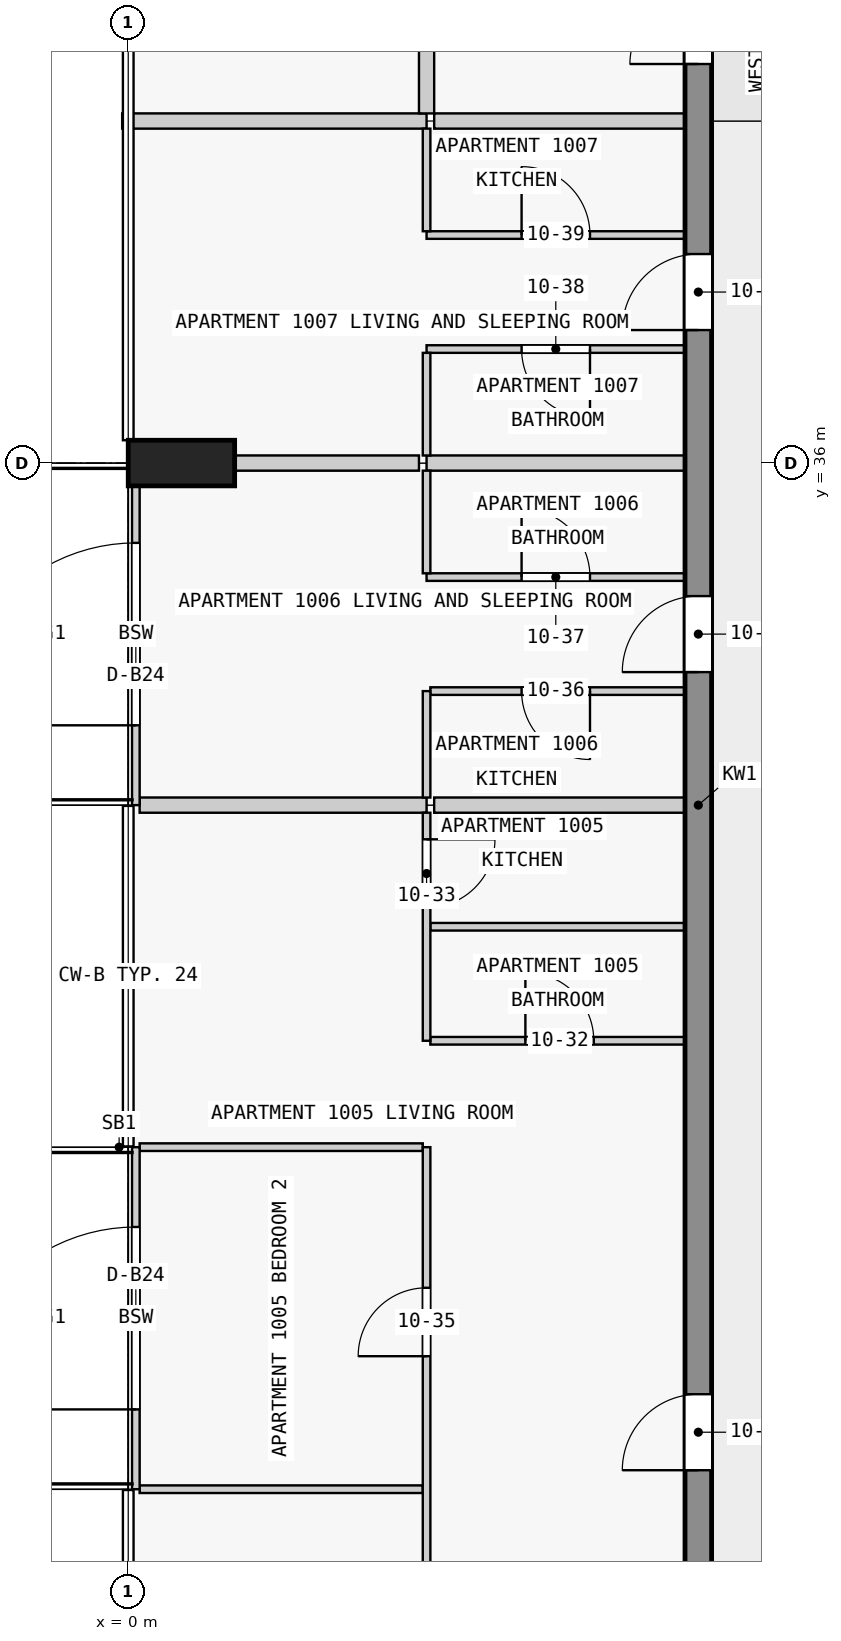
"""IFC4 building model, lengths in metres.
Left out: names, types, materials, properties, quantities, classifications, styles, units other than length and angle.
Written with IfcOpenShell. Run it as: python <this file> out.ifc"""

import sys

from ifc_helpers import new_model, si_unit, direction, frame, frame_2d, origin, origin_2d, place, context, subcontext, project, spatial, rectangle, extrude, element, fill, save


model = new_model("IFC4")
c1 = context("Model", 3, precision=1e-05, world=origin(), true_north=direction((0.0, 1.0)))
c2 = subcontext(c1, "Body", "Model", "MODEL_VIEW")
j1 = project(units=[si_unit("LENGTHUNIT", "METRE"), si_unit("PLANEANGLEUNIT", "RADIAN")], contexts=[c1])
p1 = place(None, origin())
s1 = spatial("IfcSite", under=j1, at=p1, CompositionType="ELEMENT")
p2 = place(p1, origin())
s2 = spatial("IfcBuilding", under=s1, at=p2, CompositionType="ELEMENT")
p3 = place(p2, frame((0.0, 0.0, 44.3)))
s3 = spatial("IfcBuildingStorey", under=s2, at=p3, CompositionType="ELEMENT", Elevation=44.3)
p4 = place(p3, frame((0.7, 36.0, 0.0), z_axis=(0.0, 0.0, 1.0), x_axis=(0.0, 1.0, 0.0)))
e1 = element("IfcColumn", 1, at=p4, inside=s3, PredefinedType="COLUMN", context=c2, shape_type="SweptSolid", body=[
    extrude(rectangle(XDim=0.6, YDim=1.4, at=origin_2d()), origin(), (0.0, 0.0, 1.0), 3.5),
])
p5 = place(p3, frame((7.5, 18.0, 0.0), z_axis=(0.0, 0.0, 1.0), x_axis=(0.0, 1.0, 0.0)))
e2 = element("IfcWall", 2, at=p5, inside=s3, PredefinedType="SHEAR", context=c2, shape_type="SweptSolid", body=[
    extrude(rectangle(XDim=27.0, YDim=0.35, at=frame_2d((13.5, 0.0))), origin(), (0.0, 0.0, 1.0), 3.25),
])
p6 = place(p5, frame((4.75, 0.0, 0.0)))
e3 = element("IfcOpeningElement", 3, at=p6, cuts=e2, PredefinedType="OPENING", context=c2, shape_type="SweptSolid", body=[
    extrude(rectangle(XDim=1.0, YDim=2.1, at=frame_2d((0.5, 1.05))), frame((0.0, 0.185, 0.0), z_axis=(0.0, -1.0, 0.0), x_axis=(1.0, 0.0, 0.0)), (0.0, 0.0, 1.0), 0.37),
])
p7 = place(p5, frame((15.25, 0.0, 0.0)))
e4 = element("IfcOpeningElement", 4, at=p7, cuts=e2, PredefinedType="OPENING", context=c2, shape_type="SweptSolid", body=[
    extrude(rectangle(XDim=1.0, YDim=2.1, at=frame_2d((0.5, 1.05))), frame((0.0, 0.185, 0.0), z_axis=(0.0, -1.0, 0.0), x_axis=(1.0, 0.0, 0.0)), (0.0, 0.0, 1.0), 0.37),
])
p8 = place(p5, frame((19.75, 0.0, 0.0)))
e5 = element("IfcOpeningElement", 5, at=p8, cuts=e2, PredefinedType="OPENING", context=c2, shape_type="SweptSolid", body=[
    extrude(rectangle(XDim=1.0, YDim=2.1, at=frame_2d((0.5, 1.05))), frame((0.0, 0.185, 0.0), z_axis=(0.0, -1.0, 0.0), x_axis=(1.0, 0.0, 0.0)), (0.0, 0.0, 1.0), 0.37),
])
p9 = place(p5, frame((23.25, 0.0, 0.0)))
e6 = element("IfcOpeningElement", 6, at=p9, cuts=e2, PredefinedType="OPENING", context=c2, shape_type="SweptSolid", body=[
    extrude(rectangle(XDim=0.9, YDim=2.1, at=frame_2d((0.45, 1.05))), frame((0.0, 0.185, 0.0), z_axis=(0.0, -1.0, 0.0), x_axis=(1.0, 0.0, 0.0)), (0.0, 0.0, 1.0), 0.37),
])
p10 = place(p5, frame((25.45, 0.0, 0.0)))
e7 = element("IfcOpeningElement", 7, at=p10, cuts=e2, PredefinedType="OPENING", context=c2, shape_type="SweptSolid", body=[
    extrude(rectangle(XDim=1.0, YDim=2.1, at=frame_2d((0.5, 1.05))), frame((0.0, 0.185, 0.0), z_axis=(0.0, -1.0, 0.0), x_axis=(1.0, 0.0, 0.0)), (0.0, 0.0, 1.0), 0.37),
])
p11 = place(p3, frame((0.1, 22.5, 0.0), z_axis=(0.0, 0.0, 1.0), x_axis=(0.0, 1.0, 0.0)))
e8 = element("IfcWall", 8, at=p11, inside=s3, PredefinedType="STANDARD", context=c2, shape_type="SweptSolid", body=[
    extrude(rectangle(XDim=4.5, YDim=0.1, at=frame_2d((2.25, 0.0))), origin(), (0.0, 0.0, 1.0), 3.25),
])
p12 = place(p11, frame((1.05, 0.0, 0.0)))
e9 = element("IfcOpeningElement", 9, at=p12, cuts=e8, PredefinedType="OPENING", context=c2, shape_type="SweptSolid", body=[
    extrude(rectangle(XDim=2.4, YDim=2.4, at=frame_2d((1.2, 1.2))), frame((0.0, 0.06, 0.0), z_axis=(0.0, -1.0, 0.0), x_axis=(1.0, 0.0, 0.0)), (0.0, 0.0, 1.0), 0.12),
])
p13 = place(p3, frame((0.1, 31.5, 0.0), z_axis=(0.0, 0.0, 1.0), x_axis=(0.0, 1.0, 0.0)))
e10 = element("IfcWall", 10, at=p13, inside=s3, PredefinedType="STANDARD", context=c2, shape_type="SweptSolid", body=[
    extrude(rectangle(XDim=4.5, YDim=0.1, at=frame_2d((2.25, 0.0))), origin(), (0.0, 0.0, 1.0), 3.25),
])
p14 = place(p13, frame((1.05, 0.0, 0.0)))
e11 = element("IfcOpeningElement", 11, at=p14, cuts=e10, PredefinedType="OPENING", context=c2, shape_type="SweptSolid", body=[
    extrude(rectangle(XDim=2.4, YDim=2.4, at=frame_2d((1.2, 1.2))), frame((0.0, 0.06, 0.0), z_axis=(0.0, -1.0, 0.0), x_axis=(1.0, 0.0, 0.0)), (0.0, 0.0, 1.0), 0.12),
])
for number, where, z_axis, x_axis in (
    (12, (3.875, 22.5, 0.0), (0.0, 0.0, 1.0), (-1.0, 0.0, 0.0)),
    (13, (3.875, 27.0, 0.0), (0.0, 0.0, 1.0), (-1.0, 0.0, 0.0)),
):
    element("IfcWall", number, at=place(p3, frame(where, z_axis=z_axis, x_axis=x_axis)), inside=s3, PredefinedType="PARTITIONING", context=c2, shape_type="SweptSolid", body=[
        extrude(rectangle(XDim=3.725, YDim=0.1, at=frame_2d((1.863, 0.0))), origin(), (0.0, 0.0, 1.0), 3.25),
    ])
p15 = place(p3, frame((3.975, 28.4, 0.0), z_axis=(0.0, 0.0, 1.0), x_axis=(1.0, 0.0, 0.0)))
e14 = element("IfcWall", 14, at=p15, inside=s3, PredefinedType="PARTITIONING", context=c2, shape_type="SweptSolid", body=[
    extrude(rectangle(XDim=3.35, YDim=0.1, at=frame_2d((1.675, 0.0))), origin(), (0.0, 0.0, 1.0), 3.25),
])
p16 = place(p15, frame((1.25, 0.0, 0.0)))
e15 = element("IfcOpeningElement", 15, at=p16, cuts=e14, PredefinedType="OPENING", context=c2, shape_type="SweptSolid", body=[
    extrude(rectangle(XDim=0.9, YDim=2.1, at=frame_2d((0.45, 1.05))), frame((0.0, 0.06, 0.0), z_axis=(0.0, -1.0, 0.0), x_axis=(1.0, 0.0, 0.0)), (0.0, 0.0, 1.0), 0.12),
])
p17 = place(p3, frame((7.325, 29.9, 0.0), z_axis=(0.0, 0.0, 1.0), x_axis=(-1.0, 0.0, 0.0)))
e16 = element("IfcWall", 16, at=p17, inside=s3, PredefinedType="PARTITIONING", context=c2, shape_type="SweptSolid", body=[
    extrude(rectangle(XDim=3.35, YDim=0.1, at=frame_2d((1.675, 0.0))), origin(), (0.0, 0.0, 1.0), 3.25),
])
p18 = place(p3, frame((7.325, 31.5, 0.0), z_axis=(0.0, 0.0, 1.0), x_axis=(-1.0, 0.0, 0.0)))
e17 = element("IfcWall", 17, at=p18, inside=s3, PredefinedType="PARTITIONING", context=c2, shape_type="SweptSolid", body=[
    extrude(rectangle(XDim=3.3, YDim=0.2, at=frame_2d((1.65, 0.0))), origin(), (0.0, 0.0, 1.0), 3.25),
])
p19 = place(p3, frame((0.15, 31.5, 0.0), z_axis=(0.0, 0.0, 1.0), x_axis=(1.0, 0.0, 0.0)))
e18 = element("IfcWall", 18, at=p19, inside=s3, PredefinedType="PARTITIONING", context=c2, shape_type="SweptSolid", body=[
    extrude(rectangle(XDim=3.775, YDim=0.2, at=frame_2d((1.888, 0.0))), origin(), (0.0, 0.0, 1.0), 3.25),
])
p20 = place(p3, frame((7.325, 33.0, 0.0), z_axis=(0.0, 0.0, 1.0), x_axis=(-1.0, 0.0, 0.0)))
e19 = element("IfcWall", 19, at=p20, inside=s3, PredefinedType="PARTITIONING", context=c2, shape_type="SweptSolid", body=[
    extrude(rectangle(XDim=3.35, YDim=0.1, at=frame_2d((1.675, 0.0))), origin(), (0.0, 0.0, 1.0), 3.25),
])
p21 = place(p20, frame((1.25, 0.0, 0.0)))
e20 = element("IfcOpeningElement", 20, at=p21, cuts=e19, PredefinedType="OPENING", context=c2, shape_type="SweptSolid", body=[
    extrude(rectangle(XDim=0.9, YDim=2.1, at=frame_2d((0.45, 1.05))), frame((0.0, 0.06, 0.0), z_axis=(0.0, -1.0, 0.0), x_axis=(1.0, 0.0, 0.0)), (0.0, 0.0, 1.0), 0.12),
])
p22 = place(p3, frame((3.925, 34.5, 0.0), z_axis=(0.0, 0.0, 1.0), x_axis=(1.0, 0.0, 0.0)))
e21 = element("IfcWall", 21, at=p22, inside=s3, PredefinedType="PARTITIONING", context=c2, shape_type="SweptSolid", body=[
    extrude(rectangle(XDim=3.4, YDim=0.1, at=frame_2d((1.7, 0.0))), origin(), (0.0, 0.0, 1.0), 3.25),
])
p23 = place(p22, frame((1.25, 0.0, 0.0)))
e22 = element("IfcOpeningElement", 22, at=p23, cuts=e21, PredefinedType="OPENING", context=c2, shape_type="SweptSolid", body=[
    extrude(rectangle(XDim=0.9, YDim=2.1, at=frame_2d((0.45, 1.05))), frame((0.0, 0.06, 0.0), z_axis=(0.0, -1.0, 0.0), x_axis=(1.0, 0.0, 0.0)), (0.0, 0.0, 1.0), 0.12),
])
p24 = place(p3, frame((7.325, 36.0, 0.0), z_axis=(0.0, 0.0, 1.0), x_axis=(-1.0, 0.0, 0.0)))
e23 = element("IfcWall", 23, at=p24, inside=s3, PredefinedType="PARTITIONING", context=c2, shape_type="SweptSolid", body=[
    extrude(rectangle(XDim=3.4, YDim=0.2, at=frame_2d((1.7, 0.0))), origin(), (0.0, 0.0, 1.0), 3.25),
])
p25 = place(p3, frame((1.4, 36.0, 0.0), z_axis=(0.0, 0.0, 1.0), x_axis=(1.0, 0.0, 0.0)))
e24 = element("IfcWall", 24, at=p25, inside=s3, PredefinedType="PARTITIONING", context=c2, shape_type="SweptSolid", body=[
    extrude(rectangle(XDim=2.425, YDim=0.2, at=frame_2d((1.212, 0.0))), origin(), (0.0, 0.0, 1.0), 3.25),
])
p26 = place(p3, frame((7.325, 37.5, 0.0), z_axis=(0.0, 0.0, 1.0), x_axis=(-1.0, 0.0, 0.0)))
e25 = element("IfcWall", 25, at=p26, inside=s3, PredefinedType="PARTITIONING", context=c2, shape_type="SweptSolid", body=[
    extrude(rectangle(XDim=3.4, YDim=0.1, at=frame_2d((1.7, 0.0))), origin(), (0.0, 0.0, 1.0), 3.25),
])
p27 = place(p26, frame((1.25, 0.0, 0.0)))
e26 = element("IfcOpeningElement", 26, at=p27, cuts=e25, PredefinedType="OPENING", context=c2, shape_type="SweptSolid", body=[
    extrude(rectangle(XDim=0.9, YDim=2.1, at=frame_2d((0.45, 1.05))), frame((0.0, 0.06, 0.0), z_axis=(0.0, -1.0, 0.0), x_axis=(1.0, 0.0, 0.0)), (0.0, 0.0, 1.0), 0.12),
])
p28 = place(p3, frame((3.925, 39.0, 0.0), z_axis=(0.0, 0.0, 1.0), x_axis=(1.0, 0.0, 0.0)))
e27 = element("IfcWall", 27, at=p28, inside=s3, PredefinedType="PARTITIONING", context=c2, shape_type="SweptSolid", body=[
    extrude(rectangle(XDim=3.4, YDim=0.1, at=frame_2d((1.7, 0.0))), origin(), (0.0, 0.0, 1.0), 3.25),
])
p29 = place(p28, frame((1.25, 0.0, 0.0)))
e28 = element("IfcOpeningElement", 28, at=p29, cuts=e27, PredefinedType="OPENING", context=c2, shape_type="SweptSolid", body=[
    extrude(rectangle(XDim=0.9, YDim=2.1, at=frame_2d((0.45, 1.05))), frame((0.0, 0.06, 0.0), z_axis=(0.0, -1.0, 0.0), x_axis=(1.0, 0.0, 0.0)), (0.0, 0.0, 1.0), 0.12),
])
p30 = place(p3, frame((7.325, 40.5, 0.0), z_axis=(0.0, 0.0, 1.0), x_axis=(-1.0, 0.0, 0.0)))
e29 = element("IfcWall", 29, at=p30, inside=s3, PredefinedType="PARTITIONING", context=c2, shape_type="SweptSolid", body=[
    extrude(rectangle(XDim=3.3, YDim=0.2, at=frame_2d((1.65, 0.0))), origin(), (0.0, 0.0, 1.0), 3.25),
])
p31 = place(p3, frame((-0.08, 40.5, 0.0), z_axis=(0.0, 0.0, 1.0), x_axis=(1.0, 0.0, 0.0)))
e30 = element("IfcWall", 30, at=p31, inside=s3, PredefinedType="PARTITIONING", context=c2, shape_type="SweptSolid", body=[
    extrude(rectangle(XDim=4.005, YDim=0.2, at=frame_2d((2.002, 0.0))), origin(), (0.0, 0.0, 1.0), 3.25),
])
p32 = place(p3, frame((3.925, 31.4, 0.0), z_axis=(0.0, 0.0, 1.0), x_axis=(0.0, -1.0, 0.0)))
e31 = element("IfcWall", 31, at=p32, inside=s3, PredefinedType="PARTITIONING", context=c2, shape_type="SweptSolid", body=[
    extrude(rectangle(XDim=3.0, YDim=0.1, at=frame_2d((1.5, 0.0))), origin(), (0.0, 0.0, 1.0), 3.25),
])
p33 = place(p32, frame((0.35, 0.0, 0.0)))
e32 = element("IfcOpeningElement", 32, at=p33, cuts=e31, PredefinedType="OPENING", context=c2, shape_type="SweptSolid", body=[
    extrude(rectangle(XDim=0.9, YDim=2.1, at=frame_2d((0.45, 1.05))), frame((0.0, 0.06, 0.0), z_axis=(0.0, -1.0, 0.0), x_axis=(1.0, 0.0, 0.0)), (0.0, 0.0, 1.0), 0.12),
])
p34 = place(p3, frame((3.925, 33.0, 0.0), z_axis=(0.0, 0.0, 1.0), x_axis=(0.0, -1.0, 0.0)))
e33 = element("IfcWall", 33, at=p34, inside=s3, PredefinedType="PARTITIONING", context=c2, shape_type="SweptSolid", body=[
    extrude(rectangle(XDim=1.4, YDim=0.1, at=frame_2d((0.7, 0.0))), origin(), (0.0, 0.0, 1.0), 3.25),
])
for number, where, z_axis, x_axis in (
    (34, (3.925, 35.9, 0.0), (0.0, 0.0, 1.0), (0.0, -1.0, 0.0)),
    (35, (3.925, 37.45, 0.0), (0.0, 0.0, 1.0), (0.0, -1.0, 0.0)),
    (36, (3.925, 40.4, 0.0), (0.0, 0.0, 1.0), (0.0, -1.0, 0.0)),
):
    element("IfcWall", number, at=place(p3, frame(where, z_axis=z_axis, x_axis=x_axis)), inside=s3, PredefinedType="PARTITIONING", context=c2, shape_type="SweptSolid", body=[
        extrude(rectangle(XDim=1.35, YDim=0.1, at=frame_2d((0.675, 0.0))), origin(), (0.0, 0.0, 1.0), 3.25),
    ])
p35 = place(p3, frame((3.925, 18.0, 0.0), z_axis=(0.0, 0.0, 1.0), x_axis=(0.0, 1.0, 0.0)))
e37 = element("IfcWall", 37, at=p35, inside=s3, PredefinedType="PARTITIONING", context=c2, shape_type="SweptSolid", body=[
    extrude(rectangle(XDim=9.0, YDim=0.1, at=frame_2d((4.5, 0.0))), origin(), (0.0, 0.0, 1.0), 3.25),
])
p36 = place(p35, frame((1.85, 0.0, 0.0)))
e38 = element("IfcOpeningElement", 38, at=p36, cuts=e37, PredefinedType="OPENING", context=c2, shape_type="SweptSolid", body=[
    extrude(rectangle(XDim=0.9, YDim=2.1, at=frame_2d((0.45, 1.05))), frame((0.0, 0.06, 0.0), z_axis=(0.0, -1.0, 0.0), x_axis=(1.0, 0.0, 0.0)), (0.0, 0.0, 1.0), 0.12),
])
p37 = place(p35, frame((6.25, 0.0, 0.0)))
e39 = element("IfcOpeningElement", 39, at=p37, cuts=e37, PredefinedType="OPENING", context=c2, shape_type="SweptSolid", body=[
    extrude(rectangle(XDim=0.9, YDim=2.1, at=frame_2d((0.45, 1.05))), frame((0.0, 0.06, 0.0), z_axis=(0.0, -1.0, 0.0), x_axis=(1.0, 0.0, 0.0)), (0.0, 0.0, 1.0), 0.12),
])
p38 = place(p3, frame((3.925, 42.8, 0.0), z_axis=(0.0, 0.0, 1.0), x_axis=(0.0, -1.0, 0.0)))
e40 = element("IfcWall", 40, at=p38, inside=s3, PredefinedType="PARTITIONING", context=c2, shape_type="SweptSolid", body=[
    extrude(rectangle(XDim=2.2, YDim=0.2, at=frame_2d((1.1, 0.0))), origin(), (0.0, 0.0, 1.0), 3.25),
])
p39 = place(p12, origin())
e41 = element("IfcDoor", 41, at=p39, inside=s3, OperationType="SINGLE_SWING_LEFT", PredefinedType="DOOR", context=c2, shape_type="SweptSolid", body=[
    extrude(rectangle(XDim=2.4, YDim=2.4, at=frame_2d((1.2, 1.2))), frame((0.0, 0.025, 0.0), z_axis=(0.0, -1.0, 0.0), x_axis=(1.0, 0.0, 0.0)), (0.0, 0.0, 1.0), 0.05),
])
fill(e9, e41)
p40 = place(p14, origin())
e42 = element("IfcDoor", 42, at=p40, inside=s3, OperationType="SINGLE_SWING_LEFT", PredefinedType="DOOR", context=c2, shape_type="SweptSolid", body=[
    extrude(rectangle(XDim=2.4, YDim=2.4, at=frame_2d((1.2, 1.2))), frame((0.0, 0.025, 0.0), z_axis=(0.0, -1.0, 0.0), x_axis=(1.0, 0.0, 0.0)), (0.0, 0.0, 1.0), 0.05),
])
fill(e11, e42)
p41 = place(p6, origin())
e43 = element("IfcDoor", 43, at=p41, inside=s3, OperationType="SINGLE_SWING_LEFT", PredefinedType="DOOR", context=c2, shape_type="SweptSolid", body=[
    extrude(rectangle(XDim=1.0, YDim=2.1, at=frame_2d((0.5, 1.05))), frame((0.0, 0.025, 0.0), z_axis=(0.0, -1.0, 0.0), x_axis=(1.0, 0.0, 0.0)), (0.0, 0.0, 1.0), 0.05),
])
fill(e3, e43)
p42 = place(p7, origin())
e44 = element("IfcDoor", 44, at=p42, inside=s3, OperationType="SINGLE_SWING_RIGHT", PredefinedType="DOOR", context=c2, shape_type="SweptSolid", body=[
    extrude(rectangle(XDim=1.0, YDim=2.1, at=frame_2d((0.5, 1.05))), frame((0.0, 0.025, 0.0), z_axis=(0.0, -1.0, 0.0), x_axis=(1.0, 0.0, 0.0)), (0.0, 0.0, 1.0), 0.05),
])
fill(e4, e44)
p43 = place(p8, origin())
e45 = element("IfcDoor", 45, at=p43, inside=s3, OperationType="SINGLE_SWING_RIGHT", PredefinedType="DOOR", context=c2, shape_type="SweptSolid", body=[
    extrude(rectangle(XDim=1.0, YDim=2.1, at=frame_2d((0.5, 1.05))), frame((0.0, 0.025, 0.0), z_axis=(0.0, -1.0, 0.0), x_axis=(1.0, 0.0, 0.0)), (0.0, 0.0, 1.0), 0.05),
])
fill(e5, e45)
p44 = place(p9, origin())
e46 = element("IfcDoor", 46, at=p44, inside=s3, OperationType="SINGLE_SWING_RIGHT", PredefinedType="DOOR", context=c2, shape_type="SweptSolid", body=[
    extrude(rectangle(XDim=0.9, YDim=2.1, at=frame_2d((0.45, 1.05))), frame((0.0, 0.025, 0.0), z_axis=(0.0, -1.0, 0.0), x_axis=(1.0, 0.0, 0.0)), (0.0, 0.0, 1.0), 0.05),
])
fill(e6, e46)
p45 = place(p16, origin())
e47 = element("IfcDoor", 47, at=p45, inside=s3, OperationType="SINGLE_SWING_RIGHT", PredefinedType="DOOR", context=c2, shape_type="SweptSolid", body=[
    extrude(rectangle(XDim=0.9, YDim=2.1, at=frame_2d((0.45, 1.05))), frame((0.0, 0.025, 0.0), z_axis=(0.0, -1.0, 0.0), x_axis=(1.0, 0.0, 0.0)), (0.0, 0.0, 1.0), 0.05),
])
fill(e15, e47)
p46 = place(p33, origin())
e48 = element("IfcDoor", 48, at=p46, inside=s3, OperationType="SINGLE_SWING_LEFT", PredefinedType="DOOR", context=c2, shape_type="SweptSolid", body=[
    extrude(rectangle(XDim=0.9, YDim=2.1, at=frame_2d((0.45, 1.05))), frame((0.0, 0.025, 0.0), z_axis=(0.0, -1.0, 0.0), x_axis=(1.0, 0.0, 0.0)), (0.0, 0.0, 1.0), 0.05),
])
fill(e32, e48)
p47 = place(p37, origin())
e49 = element("IfcDoor", 49, at=p47, inside=s3, OperationType="SINGLE_SWING_RIGHT", PredefinedType="DOOR", context=c2, shape_type="SweptSolid", body=[
    extrude(rectangle(XDim=0.9, YDim=2.1, at=frame_2d((0.45, 1.05))), frame((0.0, 0.025, 0.0), z_axis=(0.0, -1.0, 0.0), x_axis=(1.0, 0.0, 0.0)), (0.0, 0.0, 1.0), 0.05),
])
fill(e39, e49)
p48 = place(p21, origin())
e50 = element("IfcDoor", 50, at=p48, inside=s3, OperationType="SINGLE_SWING_RIGHT", PredefinedType="DOOR", context=c2, shape_type="SweptSolid", body=[
    extrude(rectangle(XDim=0.9, YDim=2.1, at=frame_2d((0.45, 1.05))), frame((0.0, 0.025, 0.0), z_axis=(0.0, -1.0, 0.0), x_axis=(1.0, 0.0, 0.0)), (0.0, 0.0, 1.0), 0.05),
])
fill(e20, e50)
p49 = place(p23, origin())
e51 = element("IfcDoor", 51, at=p49, inside=s3, OperationType="SINGLE_SWING_LEFT", PredefinedType="DOOR", context=c2, shape_type="SweptSolid", body=[
    extrude(rectangle(XDim=0.9, YDim=2.1, at=frame_2d((0.45, 1.05))), frame((0.0, 0.025, 0.0), z_axis=(0.0, -1.0, 0.0), x_axis=(1.0, 0.0, 0.0)), (0.0, 0.0, 1.0), 0.05),
])
fill(e22, e51)
p50 = place(p27, origin())
e52 = element("IfcDoor", 52, at=p50, inside=s3, OperationType="SINGLE_SWING_LEFT", PredefinedType="DOOR", context=c2, shape_type="SweptSolid", body=[
    extrude(rectangle(XDim=0.9, YDim=2.1, at=frame_2d((0.45, 1.05))), frame((0.0, 0.025, 0.0), z_axis=(0.0, -1.0, 0.0), x_axis=(1.0, 0.0, 0.0)), (0.0, 0.0, 1.0), 0.05),
])
fill(e26, e52)
p51 = place(p29, origin())
e53 = element("IfcDoor", 53, at=p51, inside=s3, OperationType="SINGLE_SWING_LEFT", PredefinedType="DOOR", context=c2, shape_type="SweptSolid", body=[
    extrude(rectangle(XDim=0.9, YDim=2.1, at=frame_2d((0.45, 1.05))), frame((0.0, 0.025, 0.0), z_axis=(0.0, -1.0, 0.0), x_axis=(1.0, 0.0, 0.0)), (0.0, 0.0, 1.0), 0.05),
])
fill(e28, e53)
save(model, sys.argv[1])
